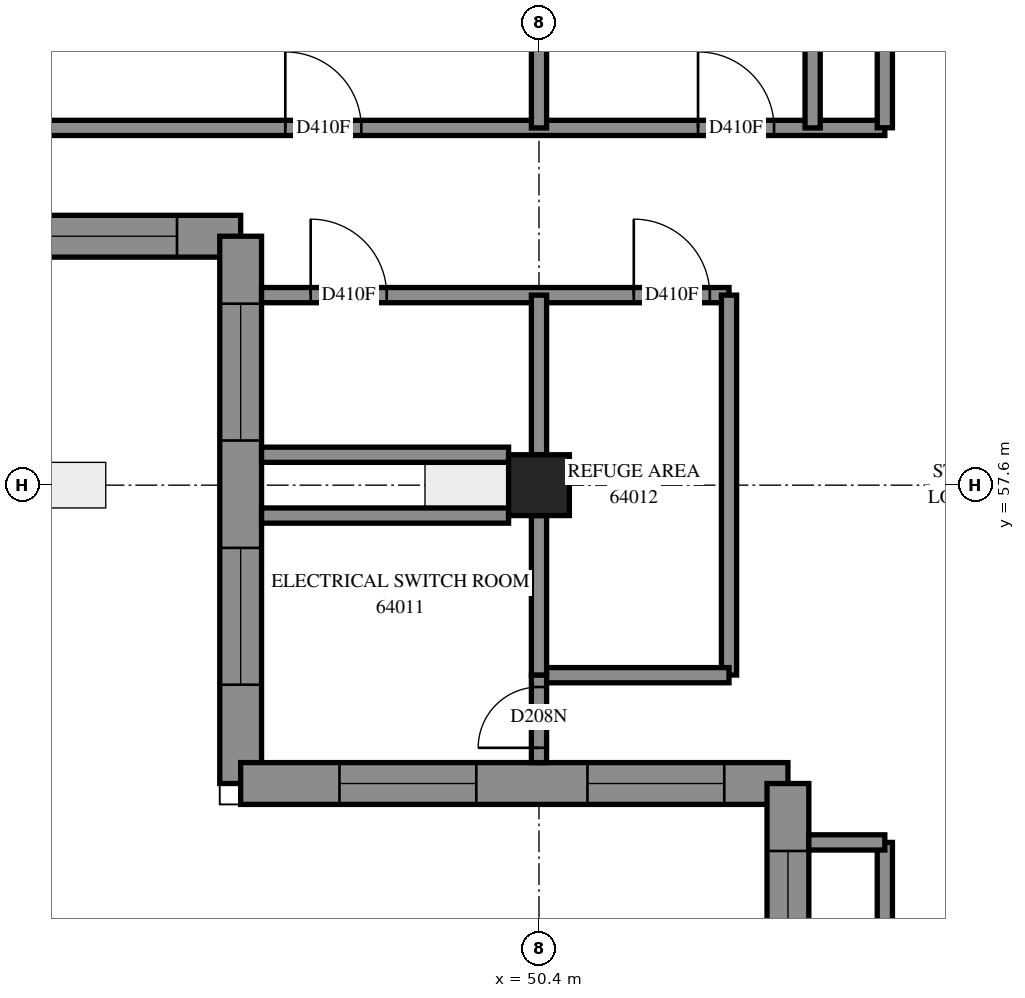
"""IFC4 building model, lengths in metres.
Left out: names, types, materials, properties, quantities, classifications, styles, units other than length and angle.
Written with IfcOpenShell. Run it as: python <this file> out.ifc"""

import sys

from ifc_helpers import new_model, si_unit, direction, frame, frame_2d, origin, origin_2d, place, context, subcontext, project, spatial, polyline, rectangle, outline, extrude, element, fill, save


model = new_model("IFC4")
c1 = context("Model", 3, precision=1e-05, world=origin(), true_north=direction((0.0, 1.0)))
c2 = subcontext(c1, "Body", "Model", "MODEL_VIEW")
j1 = project(units=[si_unit("LENGTHUNIT", "METRE"), si_unit("PLANEANGLEUNIT", "RADIAN")], contexts=[c1])
p1 = place(None, origin())
s1 = spatial("IfcSite", under=j1, at=p1, CompositionType="ELEMENT")
p2 = place(p1, origin())
s2 = spatial("IfcBuilding", under=s1, at=p2, CompositionType="ELEMENT")
p3 = place(p2, frame((0.0, 0.0, 234.6)))
s3 = spatial("IfcBuildingStorey", under=s2, at=p3, CompositionType="ELEMENT", Elevation=234.6)
p4 = place(p3, frame((50.4, 57.6, 0.0), z_axis=(0.0, 0.0, 1.0), x_axis=(1.0, 0.0, 0.0)))
e1 = element("IfcColumn", 1, at=p4, inside=s3, PredefinedType="COLUMN", context=c2, shape_type="SweptSolid", body=[
    extrude(rectangle(XDim=0.8, YDim=0.8, at=origin_2d()), origin(), (0.0, 0.0, 1.0), 4.7),
])
p5 = place(p3, frame((39.275, 60.875, 0.0), z_axis=(0.0, 0.0, 1.0), x_axis=(1.0, 0.0, 0.0)))
e2 = element("IfcWall", 2, at=p5, inside=s3, PredefinedType="SOLIDWALL", context=c2, shape_type="SweptSolid", body=[
    extrude(outline(polyline([(-0.275, -0.275), (6.925, -0.275), (7.475, 0.275), (0.275, 0.275), (-0.275, -0.275)])), origin(), (0.0, 0.0, 1.0), 4.7),
])
p6 = place(p5, frame((1.3, 0.0, 0.9)))
e3 = element("IfcOpeningElement", 3, at=p6, cuts=e2, PredefinedType="OPENING", context=c2, shape_type="SweptSolid", body=[
    extrude(rectangle(XDim=1.8, YDim=3.6, at=frame_2d((0.9, 1.8))), frame((0.0, 0.285, 0.0), z_axis=(0.0, -1.0, 0.0), x_axis=(1.0, 0.0, 0.0)), (0.0, 0.0, 1.0), 0.57),
])
p7 = place(p5, frame((4.562, 0.0, 0.9)))
e4 = element("IfcOpeningElement", 4, at=p7, cuts=e2, PredefinedType="OPENING", context=c2, shape_type="SweptSolid", body=[
    extrude(rectangle(XDim=1.8, YDim=3.6, at=frame_2d((0.9, 1.8))), frame((0.0, 0.285, 0.0), z_axis=(0.0, -1.0, 0.0), x_axis=(1.0, 0.0, 0.0)), (0.0, 0.0, 1.0), 0.57),
])
p8 = place(p3, frame((46.475, 60.875, 0.0), z_axis=(0.0, 0.0, 1.0), x_axis=(0.0, -1.0, 0.0)))
e5 = element("IfcWall", 5, at=p8, inside=s3, PredefinedType="SOLIDWALL", context=c2, shape_type="SweptSolid", body=[
    extrude(outline(polyline([(0.275, -0.275), (7.475, -0.275), (6.925, 0.275), (-0.275, 0.275), (0.275, -0.275)])), origin(), (0.0, 0.0, 1.0), 4.7),
])
p9 = place(p8, frame((0.887, 0.0, 0.9)))
e6 = element("IfcOpeningElement", 6, at=p9, cuts=e5, PredefinedType="OPENING", context=c2, shape_type="SweptSolid", body=[
    extrude(rectangle(XDim=1.8, YDim=3.6, at=frame_2d((0.9, 1.8))), frame((0.0, 0.285, 0.0), z_axis=(0.0, -1.0, 0.0), x_axis=(1.0, 0.0, 0.0)), (0.0, 0.0, 1.0), 0.57),
])
p10 = place(p8, frame((4.1, 0.0, 0.9)))
e7 = element("IfcOpeningElement", 7, at=p10, cuts=e5, PredefinedType="OPENING", context=c2, shape_type="SweptSolid", body=[
    extrude(rectangle(XDim=1.8, YDim=3.6, at=frame_2d((0.9, 1.8))), frame((0.0, 0.285, 0.0), z_axis=(0.0, -1.0, 0.0), x_axis=(1.0, 0.0, 0.0)), (0.0, 0.0, 1.0), 0.57),
])
p11 = place(p3, frame((46.475, 53.675, 0.0), z_axis=(0.0, 0.0, 1.0), x_axis=(1.0, 0.0, 0.0)))
e8 = element("IfcWall", 8, at=p11, inside=s3, PredefinedType="SOLIDWALL", context=c2, shape_type="SweptSolid", body=[
    extrude(outline(polyline([(-0.275, -0.275), (6.925, -0.275), (7.475, 0.275), (0.275, 0.275), (-0.275, -0.275)])), origin(), (0.0, 0.0, 1.0), 4.7),
])
p12 = place(p11, frame((1.3, 0.0, 0.9)))
e9 = element("IfcOpeningElement", 9, at=p12, cuts=e8, PredefinedType="OPENING", context=c2, shape_type="SweptSolid", body=[
    extrude(rectangle(XDim=1.8, YDim=3.6, at=frame_2d((0.9, 1.8))), frame((0.0, 0.285, 0.0), z_axis=(0.0, -1.0, 0.0), x_axis=(1.0, 0.0, 0.0)), (0.0, 0.0, 1.0), 0.57),
])
p13 = place(p11, frame((4.562, 0.0, 0.9)))
e10 = element("IfcOpeningElement", 10, at=p13, cuts=e8, PredefinedType="OPENING", context=c2, shape_type="SweptSolid", body=[
    extrude(rectangle(XDim=1.8, YDim=3.6, at=frame_2d((0.9, 1.8))), frame((0.0, 0.285, 0.0), z_axis=(0.0, -1.0, 0.0), x_axis=(1.0, 0.0, 0.0)), (0.0, 0.0, 1.0), 0.57),
])
p14 = place(p3, frame((53.675, 53.675, 0.0), z_axis=(0.0, 0.0, 1.0), x_axis=(0.0, -1.0, 0.0)))
e11 = element("IfcWall", 11, at=p14, inside=s3, PredefinedType="SOLIDWALL", context=c2, shape_type="SweptSolid", body=[
    extrude(outline(polyline([(0.275, -0.275), (7.475, -0.275), (6.925, 0.275), (-0.275, 0.275), (0.275, -0.275)])), origin(), (0.0, 0.0, 1.0), 4.7),
])
p15 = place(p14, frame((0.887, 0.0, 0.9)))
e12 = element("IfcOpeningElement", 12, at=p15, cuts=e11, PredefinedType="OPENING", context=c2, shape_type="SweptSolid", body=[
    extrude(rectangle(XDim=1.8, YDim=3.6, at=frame_2d((0.9, 1.8))), frame((0.0, 0.285, 0.0), z_axis=(0.0, -1.0, 0.0), x_axis=(1.0, 0.0, 0.0)), (0.0, 0.0, 1.0), 0.57),
])
p16 = place(p14, frame((4.1, 0.0, 0.9)))
e13 = element("IfcOpeningElement", 13, at=p16, cuts=e11, PredefinedType="OPENING", context=c2, shape_type="SweptSolid", body=[
    extrude(rectangle(XDim=1.8, YDim=3.6, at=frame_2d((0.9, 1.8))), frame((0.0, 0.285, 0.0), z_axis=(0.0, -1.0, 0.0), x_axis=(1.0, 0.0, 0.0)), (0.0, 0.0, 1.0), 0.57),
])
p17 = place(p3, frame((40.702, 62.3, 0.0), z_axis=(0.0, 0.0, 1.0), x_axis=(1.0, 0.0, 0.0)))
e14 = element("IfcWall", 14, at=p17, inside=s3, PredefinedType="PARTITIONING", context=c2, shape_type="SweptSolid", body=[
    extrude(rectangle(XDim=14.248, YDim=0.2, at=frame_2d((7.124, 0.0))), origin(), (0.0, 0.0, 1.0), 4.7),
])
p18 = place(p17, frame((6.361, 0.0, 0.0)))
e15 = element("IfcOpeningElement", 15, at=p18, cuts=e14, PredefinedType="OPENING", context=c2, shape_type="SweptSolid", body=[
    extrude(rectangle(XDim=1.0, YDim=2.1, at=frame_2d((0.5, 1.05))), frame((0.0, 0.11, 0.0), z_axis=(0.0, -1.0, 0.0), x_axis=(1.0, 0.0, 0.0)), (0.0, 0.0, 1.0), 0.22),
])
p19 = place(p17, frame((11.79, 0.0, 0.0)))
e16 = element("IfcOpeningElement", 16, at=p19, cuts=e14, PredefinedType="OPENING", context=c2, shape_type="SweptSolid", body=[
    extrude(rectangle(XDim=1.0, YDim=2.1, at=frame_2d((0.5, 1.05))), frame((0.0, 0.11, 0.0), z_axis=(0.0, -1.0, 0.0), x_axis=(1.0, 0.0, 0.0)), (0.0, 0.0, 1.0), 0.22),
])
p20 = place(p3, frame((46.75, 60.1, 0.0), z_axis=(0.0, 0.0, 1.0), x_axis=(1.0, 0.0, 0.0)))
e17 = element("IfcWall", 17, at=p20, inside=s3, PredefinedType="PARTITIONING", context=c2, shape_type="SweptSolid", body=[
    extrude(rectangle(XDim=6.15, YDim=0.2, at=frame_2d((3.075, 0.0))), origin(), (0.0, 0.0, 1.0), 4.7),
])
p21 = place(p20, frame((0.646, 0.0, 0.0)))
e18 = element("IfcOpeningElement", 18, at=p21, cuts=e17, PredefinedType="OPENING", context=c2, shape_type="SweptSolid", body=[
    extrude(rectangle(XDim=1.0, YDim=2.1, at=frame_2d((0.5, 1.05))), frame((0.0, 0.11, 0.0), z_axis=(0.0, -1.0, 0.0), x_axis=(1.0, 0.0, 0.0)), (0.0, 0.0, 1.0), 0.22),
])
p22 = place(p20, frame((4.897, 0.0, 0.0)))
e19 = element("IfcOpeningElement", 19, at=p22, cuts=e17, PredefinedType="OPENING", context=c2, shape_type="SweptSolid", body=[
    extrude(rectangle(XDim=1.0, YDim=2.1, at=frame_2d((0.5, 1.05))), frame((0.0, 0.11, 0.0), z_axis=(0.0, -1.0, 0.0), x_axis=(1.0, 0.0, 0.0)), (0.0, 0.0, 1.0), 0.22),
])
p23 = place(p3, frame((54.0, 62.3, 0.0), z_axis=(0.0, 0.0, 1.0), x_axis=(0.0, 1.0, 0.0)))
e20 = element("IfcWall", 20, at=p23, inside=s3, PredefinedType="PARTITIONING", context=c2, shape_type="SweptSolid", body=[
    extrude(rectangle(XDim=6.15, YDim=0.2, at=frame_2d((3.075, 0.0))), origin(), (0.0, 0.0, 1.0), 4.7),
])
p24 = place(p3, frame((54.95, 47.75, 0.0), z_axis=(0.0, 0.0, 1.0), x_axis=(0.0, 1.0, 0.0)))
e21 = element("IfcWall", 21, at=p24, inside=s3, PredefinedType="PARTITIONING", context=c2, shape_type="SweptSolid", body=[
    extrude(rectangle(XDim=5.15, YDim=0.2, at=frame_2d((2.575, 0.0))), origin(), (0.0, 0.0, 1.0), 4.7),
])
p25 = place(p3, frame((54.95, 62.302, 0.0), z_axis=(0.0, 0.0, 1.0), x_axis=(0.0, 1.0, 0.0)))
e22 = element("IfcWall", 22, at=p25, inside=s3, PredefinedType="PARTITIONING", context=c2, shape_type="SweptSolid", body=[
    extrude(rectangle(XDim=5.148, YDim=0.2, at=frame_2d((2.574, 0.0))), origin(), (0.0, 0.0, 1.0), 4.7),
])
p26 = place(p3, frame((52.9, 55.102, 0.0), z_axis=(0.0, 0.0, 1.0), x_axis=(0.0, 1.0, 0.0)))
e23 = element("IfcWall", 23, at=p26, inside=s3, PredefinedType="PARTITIONING", context=c2, shape_type="SweptSolid", body=[
    extrude(rectangle(XDim=4.998, YDim=0.2, at=frame_2d((2.499, 0.0))), origin(), (0.0, 0.0, 1.0), 4.7),
])
for number, where, z_axis, x_axis in (
    (24, (46.75, 57.2, 0.0), (0.0, 0.0, 1.0), (1.0, 0.0, 0.0)),
    (25, (46.75, 58.0, 0.0), (0.0, 0.0, 1.0), (1.0, 0.0, 0.0)),
):
    element("IfcWall", number, at=place(p3, frame(where, z_axis=z_axis, x_axis=x_axis)), inside=s3, PredefinedType="PARTITIONING", context=c2, shape_type="SweptSolid", body=[
        extrude(rectangle(XDim=3.25, YDim=0.2, at=frame_2d((1.625, 0.0))), origin(), (0.0, 0.0, 1.0), 4.7),
    ])
p27 = place(p3, frame((50.4, 55.1, 0.0), z_axis=(0.0, 0.0, 1.0), x_axis=(1.0, 0.0, 0.0)))
e26 = element("IfcWall", 26, at=p27, inside=s3, PredefinedType="PARTITIONING", context=c2, shape_type="SweptSolid", body=[
    extrude(rectangle(XDim=2.5, YDim=0.2, at=frame_2d((1.25, 0.0))), origin(), (0.0, 0.0, 1.0), 4.7),
])
for number, where, z_axis, x_axis in (
    (27, (50.4, 62.3, 0.0), (0.0, 0.0, 1.0), (0.0, 1.0, 0.0)),
    (28, (50.4, 55.1, 0.0), (0.0, 0.0, 1.0), (0.0, 1.0, 0.0)),
    (29, (50.4, 58.0, 0.0), (0.0, 0.0, 1.0), (0.0, 1.0, 0.0)),
):
    element("IfcWall", number, at=place(p3, frame(where, z_axis=z_axis, x_axis=x_axis)), inside=s3, PredefinedType="PARTITIONING", context=c2, shape_type="SweptSolid", body=[
        extrude(rectangle(XDim=2.1, YDim=0.2, at=frame_2d((1.05, 0.0))), origin(), (0.0, 0.0, 1.0), 4.7),
    ])
p28 = place(p3, frame((50.4, 53.95, 0.0), z_axis=(0.0, 0.0, 1.0), x_axis=(0.0, 1.0, 0.0)))
e30 = element("IfcWall", 30, at=p28, inside=s3, PredefinedType="PARTITIONING", context=c2, shape_type="SweptSolid", body=[
    extrude(rectangle(XDim=1.15, YDim=0.2, at=frame_2d((0.575, 0.0))), origin(), (0.0, 0.0, 1.0), 4.7),
])
p29 = place(p28, frame((0.195, 0.0, 0.0)))
e31 = element("IfcOpeningElement", 31, at=p29, cuts=e30, PredefinedType="OPENING", context=c2, shape_type="SweptSolid", body=[
    extrude(rectangle(XDim=0.8, YDim=2.1, at=frame_2d((0.4, 1.05))), frame((0.0, 0.11, 0.0), z_axis=(0.0, -1.0, 0.0), x_axis=(1.0, 0.0, 0.0)), (0.0, 0.0, 1.0), 0.22),
])
p30 = place(p3, frame((53.95, 52.9, 0.0), z_axis=(0.0, 0.0, 1.0), x_axis=(1.0, 0.0, 0.0)))
e32 = element("IfcWall", 32, at=p30, inside=s3, PredefinedType="PARTITIONING", context=c2, shape_type="SweptSolid", body=[
    extrude(rectangle(XDim=1.0, YDim=0.2, at=frame_2d((0.5, 0.0))), origin(), (0.0, 0.0, 1.0), 4.7),
])
p31 = place(p7, origin())
e33 = element("IfcWindow", 33, at=p31, inside=s3, PartitioningType="SINGLE_PANEL", PredefinedType="WINDOW", context=c2, shape_type="SweptSolid", body=[
    extrude(rectangle(XDim=1.8, YDim=3.6, at=frame_2d((0.9, 1.8))), frame((0.0, 0.155, 0.0), z_axis=(0.0, -1.0, 0.0), x_axis=(1.0, 0.0, 0.0)), (0.0, 0.0, 1.0), 0.06),
])
fill(e4, e33)
p32 = place(p9, origin())
e34 = element("IfcWindow", 34, at=p32, inside=s3, PartitioningType="SINGLE_PANEL", PredefinedType="WINDOW", context=c2, shape_type="SweptSolid", body=[
    extrude(rectangle(XDim=1.8, YDim=3.6, at=frame_2d((0.9, 1.8))), frame((0.0, 0.155, 0.0), z_axis=(0.0, -1.0, 0.0), x_axis=(1.0, 0.0, 0.0)), (0.0, 0.0, 1.0), 0.06),
])
fill(e6, e34)
p33 = place(p10, origin())
e35 = element("IfcWindow", 35, at=p33, inside=s3, PartitioningType="SINGLE_PANEL", PredefinedType="WINDOW", context=c2, shape_type="SweptSolid", body=[
    extrude(rectangle(XDim=1.8, YDim=3.6, at=frame_2d((0.9, 1.8))), frame((0.0, 0.155, 0.0), z_axis=(0.0, -1.0, 0.0), x_axis=(1.0, 0.0, 0.0)), (0.0, 0.0, 1.0), 0.06),
])
fill(e7, e35)
p34 = place(p12, origin())
e36 = element("IfcWindow", 36, at=p34, inside=s3, PartitioningType="SINGLE_PANEL", PredefinedType="WINDOW", context=c2, shape_type="SweptSolid", body=[
    extrude(rectangle(XDim=1.8, YDim=3.6, at=frame_2d((0.9, 1.8))), frame((0.0, 0.155, 0.0), z_axis=(0.0, -1.0, 0.0), x_axis=(1.0, 0.0, 0.0)), (0.0, 0.0, 1.0), 0.06),
])
fill(e9, e36)
p35 = place(p13, origin())
e37 = element("IfcWindow", 37, at=p35, inside=s3, PartitioningType="SINGLE_PANEL", PredefinedType="WINDOW", context=c2, shape_type="SweptSolid", body=[
    extrude(rectangle(XDim=1.8, YDim=3.6, at=frame_2d((0.9, 1.8))), frame((0.0, 0.155, 0.0), z_axis=(0.0, -1.0, 0.0), x_axis=(1.0, 0.0, 0.0)), (0.0, 0.0, 1.0), 0.06),
])
fill(e10, e37)
p36 = place(p15, origin())
e38 = element("IfcWindow", 38, at=p36, inside=s3, PartitioningType="SINGLE_PANEL", PredefinedType="WINDOW", context=c2, shape_type="SweptSolid", body=[
    extrude(rectangle(XDim=1.8, YDim=3.6, at=frame_2d((0.9, 1.8))), frame((0.0, 0.155, 0.0), z_axis=(0.0, -1.0, 0.0), x_axis=(1.0, 0.0, 0.0)), (0.0, 0.0, 1.0), 0.06),
])
fill(e12, e38)
p37 = place(p21, origin())
e39 = element("IfcDoor", 39, at=p37, inside=s3, OperationType="SINGLE_SWING_RIGHT", PredefinedType="DOOR", context=c2, shape_type="SweptSolid", body=[
    extrude(rectangle(XDim=1.0, YDim=2.1, at=frame_2d((0.5, 1.05))), frame((0.0, 0.025, 0.0), z_axis=(0.0, -1.0, 0.0), x_axis=(1.0, 0.0, 0.0)), (0.0, 0.0, 1.0), 0.05),
])
fill(e18, e39)
p38 = place(p22, origin())
e40 = element("IfcDoor", 40, at=p38, inside=s3, OperationType="SINGLE_SWING_LEFT", PredefinedType="DOOR", context=c2, shape_type="SweptSolid", body=[
    extrude(rectangle(XDim=1.0, YDim=2.1, at=frame_2d((0.5, 1.05))), frame((0.0, 0.025, 0.0), z_axis=(0.0, -1.0, 0.0), x_axis=(1.0, 0.0, 0.0)), (0.0, 0.0, 1.0), 0.05),
])
fill(e19, e40)
p39 = place(p18, origin())
e41 = element("IfcDoor", 41, at=p39, inside=s3, OperationType="SINGLE_SWING_RIGHT", PredefinedType="DOOR", context=c2, shape_type="SweptSolid", body=[
    extrude(rectangle(XDim=1.0, YDim=2.1, at=frame_2d((0.5, 1.05))), frame((0.0, 0.025, 0.0), z_axis=(0.0, -1.0, 0.0), x_axis=(1.0, 0.0, 0.0)), (0.0, 0.0, 1.0), 0.05),
])
fill(e15, e41)
p40 = place(p19, origin())
e42 = element("IfcDoor", 42, at=p40, inside=s3, OperationType="SINGLE_SWING_RIGHT", PredefinedType="DOOR", context=c2, shape_type="SweptSolid", body=[
    extrude(rectangle(XDim=1.0, YDim=2.1, at=frame_2d((0.5, 1.05))), frame((0.0, 0.025, 0.0), z_axis=(0.0, -1.0, 0.0), x_axis=(1.0, 0.0, 0.0)), (0.0, 0.0, 1.0), 0.05),
])
fill(e16, e42)
p41 = place(p29, origin())
e43 = element("IfcDoor", 43, at=p41, inside=s3, OperationType="SINGLE_SWING_LEFT", PredefinedType="DOOR", context=c2, shape_type="SweptSolid", body=[
    extrude(rectangle(XDim=0.8, YDim=2.1, at=frame_2d((0.4, 1.05))), frame((0.0, 0.025, 0.0), z_axis=(0.0, -1.0, 0.0), x_axis=(1.0, 0.0, 0.0)), (0.0, 0.0, 1.0), 0.05),
])
fill(e31, e43)
save(model, sys.argv[1])
